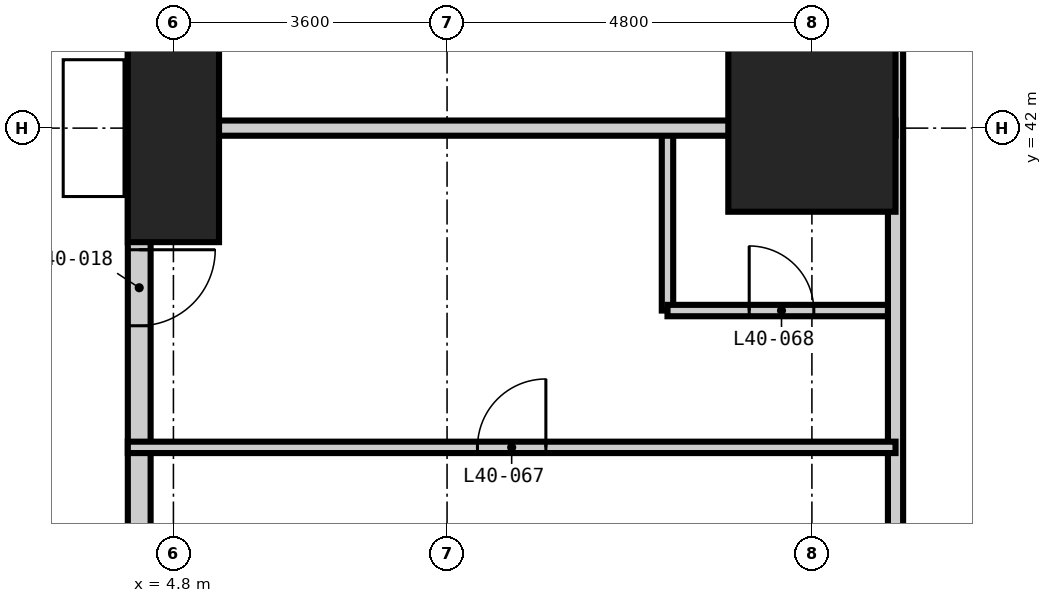
"""IFC4 building model, lengths in metres.
Left out: names, types, materials, properties, quantities, classifications, styles, units other than length and angle.
Written with IfcOpenShell. Run it as: python <this file> out.ifc"""

import sys

from ifc_helpers import new_model, si_unit, direction, frame, frame_2d, origin, origin_2d, place, context, subcontext, project, spatial, rectangle, extrude, element, fill, save


model = new_model("IFC4")
c1 = context("Model", 3, precision=1e-05, world=origin(), true_north=direction((0.0, 1.0)))
c2 = subcontext(c1, "Body", "Model", "MODEL_VIEW")
j1 = project(units=[si_unit("LENGTHUNIT", "METRE"), si_unit("PLANEANGLEUNIT", "RADIAN")], contexts=[c1])
p1 = place(None, origin())
s1 = spatial("IfcSite", under=j1, at=p1, CompositionType="ELEMENT")
p2 = place(p1, origin())
s2 = spatial("IfcBuilding", under=s1, at=p2, CompositionType="ELEMENT")
p3 = place(p2, frame((0.0, 0.0, 159.0)))
s3 = spatial("IfcBuildingStorey", under=s2, at=p3, CompositionType="ELEMENT", Elevation=159.0)
p4 = place(p3, frame((4.8, 42.0, -0.35), z_axis=(0.0, 0.0, 1.0), x_axis=(1.0, 0.0, 0.0)))
e1 = element("IfcColumn", 1, at=p4, inside=s3, PredefinedType="COLUMN", context=c2, shape_type="SweptSolid", body=[
    extrude(rectangle(XDim=1.2, YDim=3.0, at=origin_2d()), origin(), (0.0, 0.0, 1.0), 3.6),
])
p5 = place(p3, frame((13.2, 42.0, -0.35), z_axis=(0.0, 0.0, 1.0), x_axis=(1.0, 0.0, 0.0)))
e2 = element("IfcColumn", 2, at=p5, inside=s3, PredefinedType="COLUMN", context=c2, shape_type="SweptSolid", body=[
    extrude(rectangle(XDim=2.2, YDim=2.2, at=origin_2d()), origin(), (0.0, 0.0, 1.0), 3.6),
])
p6 = place(p3, frame((4.35, 51.9, 0.0), z_axis=(0.0, 0.0, 1.0), x_axis=(0.0, -1.0, 0.0)))
e3 = element("IfcWall", 3, at=p6, inside=s3, PredefinedType="SOLIDWALL", context=c2, shape_type="SweptSolid", body=[
    extrude(rectangle(XDim=45.0, YDim=0.3, at=frame_2d((22.5, 0.0))), origin(), (0.0, 0.0, 1.0), 3.25),
])
p7 = place(p6, frame((41.25, 0.0, 0.0)))
e4 = element("IfcOpeningElement", 4, at=p7, cuts=e3, PredefinedType="OPENING", context=c2, shape_type="SweptSolid", body=[
    extrude(rectangle(XDim=1.0, YDim=2.4, at=frame_2d((0.5, 1.2))), frame((0.0, 0.16, 0.0), z_axis=(0.0, -1.0, 0.0), x_axis=(1.0, 0.0, 0.0)), (0.0, 0.0, 1.0), 0.32),
])
p8 = place(p6, frame((36.7, 0.0, 0.0)))
e5 = element("IfcOpeningElement", 5, at=p8, cuts=e3, PredefinedType="OPENING", context=c2, shape_type="SweptSolid", body=[
    extrude(rectangle(XDim=1.0, YDim=2.4, at=frame_2d((0.5, 1.2))), frame((0.0, 0.16, 0.0), z_axis=(0.0, -1.0, 0.0), x_axis=(1.0, 0.0, 0.0)), (0.0, 0.0, 1.0), 0.32),
])
p9 = place(p6, frame((32.5, 0.0, 0.0)))
e6 = element("IfcOpeningElement", 6, at=p9, cuts=e3, PredefinedType="OPENING", context=c2, shape_type="SweptSolid", body=[
    extrude(rectangle(XDim=1.0, YDim=2.4, at=frame_2d((0.5, 1.2))), frame((0.0, 0.16, 0.0), z_axis=(0.0, -1.0, 0.0), x_axis=(1.0, 0.0, 0.0)), (0.0, 0.0, 1.0), 0.32),
])
p10 = place(p6, frame((28.3, 0.0, 0.0)))
e7 = element("IfcOpeningElement", 7, at=p10, cuts=e3, PredefinedType="OPENING", context=c2, shape_type="SweptSolid", body=[
    extrude(rectangle(XDim=1.0, YDim=2.4, at=frame_2d((0.5, 1.2))), frame((0.0, 0.16, 0.0), z_axis=(0.0, -1.0, 0.0), x_axis=(1.0, 0.0, 0.0)), (0.0, 0.0, 1.0), 0.32),
])
p11 = place(p6, frame((24.1, 0.0, 0.0)))
e8 = element("IfcOpeningElement", 8, at=p11, cuts=e3, PredefinedType="OPENING", context=c2, shape_type="SweptSolid", body=[
    extrude(rectangle(XDim=1.0, YDim=2.4, at=frame_2d((0.5, 1.2))), frame((0.0, 0.16, 0.0), z_axis=(0.0, -1.0, 0.0), x_axis=(1.0, 0.0, 0.0)), (0.0, 0.0, 1.0), 0.32),
])
p12 = place(p6, frame((19.9, 0.0, 0.0)))
e9 = element("IfcOpeningElement", 9, at=p12, cuts=e3, PredefinedType="OPENING", context=c2, shape_type="SweptSolid", body=[
    extrude(rectangle(XDim=1.0, YDim=2.4, at=frame_2d((0.5, 1.2))), frame((0.0, 0.16, 0.0), z_axis=(0.0, -1.0, 0.0), x_axis=(1.0, 0.0, 0.0)), (0.0, 0.0, 1.0), 0.32),
])
p13 = place(p6, frame((15.7, 0.0, 0.0)))
e10 = element("IfcOpeningElement", 10, at=p13, cuts=e3, PredefinedType="OPENING", context=c2, shape_type="SweptSolid", body=[
    extrude(rectangle(XDim=1.0, YDim=2.4, at=frame_2d((0.5, 1.2))), frame((0.0, 0.16, 0.0), z_axis=(0.0, -1.0, 0.0), x_axis=(1.0, 0.0, 0.0)), (0.0, 0.0, 1.0), 0.32),
])
p14 = place(p6, frame((11.5, 0.0, 0.0)))
e11 = element("IfcOpeningElement", 11, at=p14, cuts=e3, PredefinedType="OPENING", context=c2, shape_type="SweptSolid", body=[
    extrude(rectangle(XDim=1.0, YDim=2.4, at=frame_2d((0.5, 1.2))), frame((0.0, 0.16, 0.0), z_axis=(0.0, -1.0, 0.0), x_axis=(1.0, 0.0, 0.0)), (0.0, 0.0, 1.0), 0.32),
])
p15 = place(p6, frame((7.3, 0.0, 0.0)))
e12 = element("IfcOpeningElement", 12, at=p15, cuts=e3, PredefinedType="OPENING", context=c2, shape_type="SweptSolid", body=[
    extrude(rectangle(XDim=1.0, YDim=2.4, at=frame_2d((0.5, 1.2))), frame((0.0, 0.16, 0.0), z_axis=(0.0, -1.0, 0.0), x_axis=(1.0, 0.0, 0.0)), (0.0, 0.0, 1.0), 0.32),
])
p16 = place(p6, frame((2.75, 0.0, 0.0)))
e13 = element("IfcOpeningElement", 13, at=p16, cuts=e3, PredefinedType="OPENING", context=c2, shape_type="SweptSolid", body=[
    extrude(rectangle(XDim=1.0, YDim=2.4, at=frame_2d((0.5, 1.2))), frame((0.0, 0.16, 0.0), z_axis=(0.0, -1.0, 0.0), x_axis=(1.0, 0.0, 0.0)), (0.0, 0.0, 1.0), 0.32),
])
p17 = place(p3, frame((11.3, 39.6, 0.0), z_axis=(0.0, 0.0, 1.0), x_axis=(0.0, 1.0, 0.0)))
e14 = element("IfcWall", 14, at=p17, inside=s3, PredefinedType="PARTITIONING", context=c2, shape_type="SweptSolid", body=[
    extrude(rectangle(XDim=2.4, YDim=0.15, at=frame_2d((1.2, 0.0))), origin(), (0.0, 0.0, 1.0), 3.25),
])
p18 = place(p3, frame((11.3, 39.6, 0.0), z_axis=(0.0, 0.0, 1.0), x_axis=(1.0, 0.0, 0.0)))
e15 = element("IfcWall", 15, at=p18, inside=s3, PredefinedType="PARTITIONING", context=c2, shape_type="SweptSolid", body=[
    extrude(rectangle(XDim=3.0, YDim=0.15, at=frame_2d((1.5, 0.0))), origin(), (0.0, 0.0, 1.0), 3.25),
])
p19 = place(p18, frame((1.075, 0.0, 0.0)))
e16 = element("IfcOpeningElement", 16, at=p19, cuts=e15, PredefinedType="OPENING", context=c2, shape_type="SweptSolid", body=[
    extrude(rectangle(XDim=0.85, YDim=2.1, at=frame_2d((0.425, 1.05))), frame((0.0, 0.085, 0.0), z_axis=(0.0, -1.0, 0.0), x_axis=(1.0, 0.0, 0.0)), (0.0, 0.0, 1.0), 0.17),
])
p20 = place(p3, frame((14.3, 14.3, 0.0), z_axis=(0.0, 0.0, 1.0), x_axis=(0.0, 1.0, 0.0)))
e17 = element("IfcWall", 17, at=p20, inside=s3, PredefinedType="PARTITIONING", context=c2, shape_type="SweptSolid", body=[
    extrude(rectangle(XDim=31.4, YDim=0.2, at=frame_2d((15.7, 0.0))), origin(), (0.0, 0.0, 1.0), 3.25),
])
p21 = place(p20, frame((8.3, 0.0, 0.0)))
e18 = element("IfcOpeningElement", 18, at=p21, cuts=e17, PredefinedType="OPENING", context=c2, shape_type="SweptSolid", body=[
    extrude(rectangle(XDim=1.0, YDim=2.2, at=frame_2d((0.5, 1.1))), frame((0.0, 0.11, 0.0), z_axis=(0.0, -1.0, 0.0), x_axis=(1.0, 0.0, 0.0)), (0.0, 0.0, 1.0), 0.22),
])
p22 = place(p20, frame((20.9, 0.0, 0.0)))
e19 = element("IfcOpeningElement", 19, at=p22, cuts=e17, PredefinedType="OPENING", context=c2, shape_type="SweptSolid", body=[
    extrude(rectangle(XDim=1.0, YDim=2.2, at=frame_2d((0.5, 1.1))), frame((0.0, 0.11, 0.0), z_axis=(0.0, -1.0, 0.0), x_axis=(1.0, 0.0, 0.0)), (0.0, 0.0, 1.0), 0.22),
])
p23 = place(p20, frame((0.35, 0.0, 0.0)))
e20 = element("IfcOpeningElement", 20, at=p23, cuts=e17, PredefinedType="OPENING", context=c2, shape_type="SweptSolid", body=[
    extrude(rectangle(XDim=1.0, YDim=2.2, at=frame_2d((0.5, 1.1))), frame((0.0, 0.11, 0.0), z_axis=(0.0, -1.0, 0.0), x_axis=(1.0, 0.0, 0.0)), (0.0, 0.0, 1.0), 0.22),
])
p24 = place(p20, frame((29.05, 0.0, 0.0)))
e21 = element("IfcOpeningElement", 21, at=p24, cuts=e17, PredefinedType="OPENING", context=c2, shape_type="SweptSolid", body=[
    extrude(rectangle(XDim=1.0, YDim=2.2, at=frame_2d((0.5, 1.1))), frame((0.0, 0.11, 0.0), z_axis=(0.0, -1.0, 0.0), x_axis=(1.0, 0.0, 0.0)), (0.0, 0.0, 1.0), 0.22),
])
p25 = place(p3, frame((4.2, 42.0, 0.0), z_axis=(0.0, 0.0, 1.0), x_axis=(1.0, 0.0, 0.0)))
e22 = element("IfcWall", 22, at=p25, inside=s3, PredefinedType="PARTITIONING", context=c2, shape_type="SweptSolid", body=[
    extrude(rectangle(XDim=10.1, YDim=0.2, at=frame_2d((5.05, 0.0))), origin(), (0.0, 0.0, 1.0), 3.25),
])
p26 = place(p3, frame((4.2, 37.8, 0.0), z_axis=(0.0, 0.0, 1.0), x_axis=(1.0, 0.0, 0.0)))
e23 = element("IfcWall", 23, at=p26, inside=s3, PredefinedType="PARTITIONING", context=c2, shape_type="SweptSolid", body=[
    extrude(rectangle(XDim=10.1, YDim=0.15, at=frame_2d((5.05, 0.0))), origin(), (0.0, 0.0, 1.0), 3.25),
])
p27 = place(p26, frame((4.6, 0.0, 0.0)))
e24 = element("IfcOpeningElement", 24, at=p27, cuts=e23, PredefinedType="OPENING", context=c2, shape_type="SweptSolid", body=[
    extrude(rectangle(XDim=0.9, YDim=2.1, at=frame_2d((0.45, 1.05))), frame((0.0, 0.085, 0.0), z_axis=(0.0, -1.0, 0.0), x_axis=(1.0, 0.0, 0.0)), (0.0, 0.0, 1.0), 0.17),
])
p28 = place(p14, origin())
e25 = element("IfcDoor", 25, at=p28, inside=s3, OperationType="SINGLE_SWING_LEFT", PredefinedType="DOOR", context=c2, shape_type="SweptSolid", body=[
    extrude(rectangle(XDim=1.0, YDim=2.4, at=frame_2d((0.5, 1.2))), frame((0.0, 0.025, 0.0), z_axis=(0.0, -1.0, 0.0), x_axis=(1.0, 0.0, 0.0)), (0.0, 0.0, 1.0), 0.05),
])
fill(e11, e25)
p29 = place(p27, origin())
e26 = element("IfcDoor", 26, at=p29, inside=s3, OperationType="SINGLE_SWING_RIGHT", PredefinedType="DOOR", context=c2, shape_type="SweptSolid", body=[
    extrude(rectangle(XDim=0.9, YDim=2.1, at=frame_2d((0.45, 1.05))), frame((0.0, 0.025, 0.0), z_axis=(0.0, -1.0, 0.0), x_axis=(1.0, 0.0, 0.0)), (0.0, 0.0, 1.0), 0.05),
])
fill(e24, e26)
p30 = place(p19, origin())
e27 = element("IfcDoor", 27, at=p30, inside=s3, OperationType="SINGLE_SWING_LEFT", PredefinedType="DOOR", context=c2, shape_type="SweptSolid", body=[
    extrude(rectangle(XDim=0.85, YDim=2.1, at=frame_2d((0.425, 1.05))), frame((0.0, 0.025, 0.0), z_axis=(0.0, -1.0, 0.0), x_axis=(1.0, 0.0, 0.0)), (0.0, 0.0, 1.0), 0.05),
])
fill(e16, e27)
save(model, sys.argv[1])
